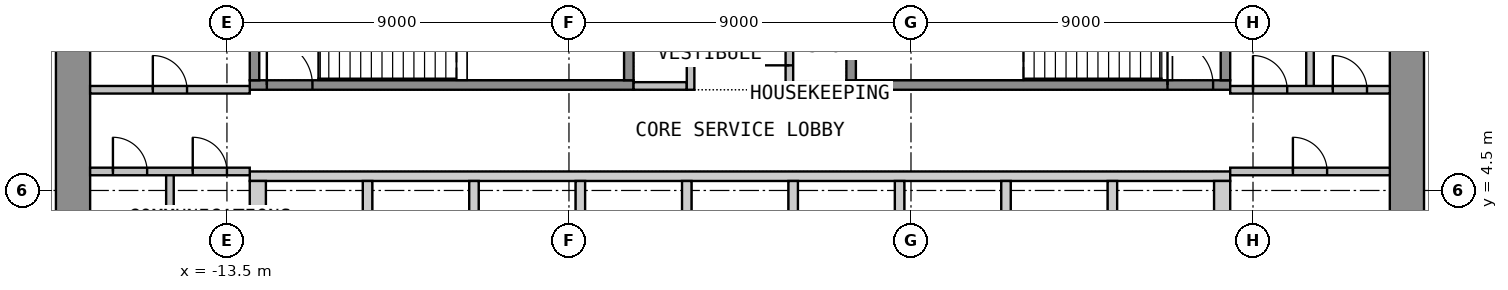
"""IFC4 building model, lengths in metres.
Left out: names, types, materials, properties, quantities, classifications, styles, units other than length and angle.
Written with IfcOpenShell. Run it as: python <this file> out.ifc"""

import sys

from ifc_helpers import new_model, si_unit, direction, frame, frame_2d, origin, place, context, subcontext, project, spatial, polyline, rectangle, outline, extrude, element, fill, save


model = new_model("IFC4")
c1 = context("Model", 3, precision=1e-05, world=origin(), true_north=direction((0.0, 1.0)))
c2 = subcontext(c1, "Body", "Model", "MODEL_VIEW")
j1 = project(units=[si_unit("LENGTHUNIT", "METRE"), si_unit("PLANEANGLEUNIT", "RADIAN")], contexts=[c1])
p1 = place(None, origin())
s1 = spatial("IfcSite", under=j1, at=p1, CompositionType="ELEMENT")
p2 = place(p1, origin())
s2 = spatial("IfcBuilding", under=s1, at=p2, CompositionType="ELEMENT")
p3 = place(p2, frame((0.0, 0.0, 15.6)))
s3 = spatial("IfcBuildingStorey", under=s2, at=p3, CompositionType="ELEMENT", Elevation=15.6)
p4 = place(p3, frame((-17.55, -12.6, 0.0), z_axis=(0.0, 0.0, 1.0), x_axis=(0.0, 1.0, 0.0)))
e1 = element("IfcWall", 1, at=p4, inside=s3, PredefinedType="SHEAR", context=c2, shape_type="SweptSolid", body=[
    extrude(rectangle(XDim=25.2, YDim=0.9, at=frame_2d((12.6, 0.0))), origin(), (0.0, 0.0, 1.0), 4.4),
])
p5 = place(p4, frame((11.4, 0.0, 0.0)))
e2 = element("IfcOpeningElement", 2, at=p5, cuts=e1, PredefinedType="OPENING", context=c2, shape_type="SweptSolid", body=[
    extrude(rectangle(XDim=2.4, YDim=2.1, at=frame_2d((1.2, 1.05))), frame((0.0, 0.46, 0.0), z_axis=(0.0, -1.0, 0.0), x_axis=(1.0, 0.0, 0.0)), (0.0, 0.0, 1.0), 0.92),
])
p6 = place(p3, frame((17.55, -12.6, 0.0), z_axis=(0.0, 0.0, 1.0), x_axis=(0.0, 1.0, 0.0)))
e3 = element("IfcWall", 3, at=p6, inside=s3, PredefinedType="SHEAR", context=c2, shape_type="SweptSolid", body=[
    extrude(rectangle(XDim=25.2, YDim=0.9, at=frame_2d((12.6, 0.0))), origin(), (0.0, 0.0, 1.0), 4.4),
])
p7 = place(p6, frame((11.4, 0.0, 0.0)))
e4 = element("IfcOpeningElement", 4, at=p7, cuts=e3, PredefinedType="OPENING", context=c2, shape_type="SweptSolid", body=[
    extrude(rectangle(XDim=2.4, YDim=2.1, at=frame_2d((1.2, 1.05))), frame((0.0, 0.46, 0.0), z_axis=(0.0, -1.0, 0.0), x_axis=(1.0, 0.0, 0.0)), (0.0, 0.0, 1.0), 0.92),
])
p8 = place(p3, origin())
e5 = element("IfcWall", 5, at=p8, inside=s3, PredefinedType="SHEAR", context=c2, shape_type="SweptSolid", body=[
    extrude(outline(polyline([(-12.9, 4.75), (12.9, 4.75), (12.9, 5.0), (-12.9, 5.0), (-12.9, 4.75)])), origin(), (0.0, 0.0, 1.0), 4.4),
])
p9 = place(p3, origin())
e6 = element("IfcWall", 6, at=p9, inside=s3, PredefinedType="SHEAR", context=c2, shape_type="SweptSolid", body=[
    extrude(outline(polyline([(-12.9, 2.05), (-12.475, 2.05), (-12.475, 4.75), (-12.9, 4.75), (-12.9, 2.05)])), origin(), (0.0, 0.0, 1.0), 4.4),
])
p10 = place(p3, origin())
e7 = element("IfcWall", 7, at=p10, inside=s3, PredefinedType="SHEAR", context=c2, shape_type="SweptSolid", body=[
    extrude(outline(polyline([(-9.925, 2.05), (-9.675, 2.05), (-9.675, 4.75), (-9.925, 4.75), (-9.925, 2.05)])), origin(), (0.0, 0.0, 1.0), 4.4),
])
p11 = place(p3, origin())
e8 = element("IfcWall", 8, at=p11, inside=s3, PredefinedType="SHEAR", context=c2, shape_type="SweptSolid", body=[
    extrude(outline(polyline([(-7.125, 2.05), (-6.875, 2.05), (-6.875, 4.75), (-7.125, 4.75), (-7.125, 2.05)])), origin(), (0.0, 0.0, 1.0), 4.4),
])
p12 = place(p3, origin())
e9 = element("IfcWall", 9, at=p12, inside=s3, PredefinedType="SHEAR", context=c2, shape_type="SweptSolid", body=[
    extrude(outline(polyline([(-4.325, 2.05), (-4.075, 2.05), (-4.075, 4.75), (-4.325, 4.75), (-4.325, 2.05)])), origin(), (0.0, 0.0, 1.0), 4.4),
])
p13 = place(p3, origin())
e10 = element("IfcWall", 10, at=p13, inside=s3, PredefinedType="SHEAR", context=c2, shape_type="SweptSolid", body=[
    extrude(outline(polyline([(-1.525, 2.05), (-1.275, 2.05), (-1.275, 4.75), (-1.525, 4.75), (-1.525, 2.05)])), origin(), (0.0, 0.0, 1.0), 4.4),
])
p14 = place(p3, origin())
e11 = element("IfcWall", 11, at=p14, inside=s3, PredefinedType="SHEAR", context=c2, shape_type="SweptSolid", body=[
    extrude(outline(polyline([(1.275, 2.05), (1.525, 2.05), (1.525, 4.75), (1.275, 4.75), (1.275, 2.05)])), origin(), (0.0, 0.0, 1.0), 4.4),
])
p15 = place(p3, origin())
e12 = element("IfcWall", 12, at=p15, inside=s3, PredefinedType="SHEAR", context=c2, shape_type="SweptSolid", body=[
    extrude(outline(polyline([(4.075, 2.05), (4.325, 2.05), (4.325, 4.75), (4.075, 4.75), (4.075, 2.05)])), origin(), (0.0, 0.0, 1.0), 4.4),
])
p16 = place(p3, origin())
e13 = element("IfcWall", 13, at=p16, inside=s3, PredefinedType="SHEAR", context=c2, shape_type="SweptSolid", body=[
    extrude(outline(polyline([(6.875, 2.05), (7.125, 2.05), (7.125, 4.75), (6.875, 4.75), (6.875, 2.05)])), origin(), (0.0, 0.0, 1.0), 4.4),
])
p17 = place(p3, origin())
e14 = element("IfcWall", 14, at=p17, inside=s3, PredefinedType="SHEAR", context=c2, shape_type="SweptSolid", body=[
    extrude(outline(polyline([(9.675, 2.05), (9.925, 2.05), (9.925, 4.75), (9.675, 4.75), (9.675, 2.05)])), origin(), (0.0, 0.0, 1.0), 4.4),
])
p18 = place(p3, origin())
e15 = element("IfcWall", 15, at=p18, inside=s3, PredefinedType="SHEAR", context=c2, shape_type="SweptSolid", body=[
    extrude(outline(polyline([(12.475, 2.05), (12.9, 2.05), (12.9, 4.75), (12.475, 4.75), (12.475, 2.05)])), origin(), (0.0, 0.0, 1.0), 4.4),
])
p19 = place(p3, frame((-12.9, 7.275, 0.0), z_axis=(0.0, 0.0, 1.0), x_axis=(1.0, 0.0, 0.0)))
e16 = element("IfcWall", 16, at=p19, inside=s3, PredefinedType="SHEAR", context=c2, shape_type="SweptSolid", body=[
    extrude(rectangle(XDim=10.1, YDim=0.25, at=frame_2d((5.05, 0.0))), origin(), (0.0, 0.0, 1.0), 4.4),
])
p20 = place(p19, frame((0.45, 0.0, 0.0)))
e17 = element("IfcOpeningElement", 17, at=p20, cuts=e16, PredefinedType="OPENING", context=c2, shape_type="SweptSolid", body=[
    extrude(rectangle(XDim=1.2, YDim=2.1, at=frame_2d((0.6, 1.05))), frame((0.0, 0.135, 0.0), z_axis=(0.0, -1.0, 0.0), x_axis=(1.0, 0.0, 0.0)), (0.0, 0.0, 1.0), 0.27),
])
for number, where, z_axis, x_axis in (
    (18, (-12.775, 7.4, 0.0), (0.0, 0.0, 1.0), (0.0, 1.0, 0.0)),
    (19, (-2.925, 7.4, 0.0), (0.0, 0.0, 1.0), (0.0, 1.0, 0.0)),
):
    element("IfcWall", number, at=place(p3, frame(where, z_axis=z_axis, x_axis=x_axis)), inside=s3, PredefinedType="SHEAR", context=c2, shape_type="SweptSolid", body=[
        extrude(rectangle(XDim=3.25, YDim=0.25, at=frame_2d((1.625, 0.0))), origin(), (0.0, 0.0, 1.0), 4.4),
    ])
p21 = place(p3, frame((2.8, 7.275, 0.0), z_axis=(0.0, 0.0, 1.0), x_axis=(1.0, 0.0, 0.0)))
e20 = element("IfcWall", 20, at=p21, inside=s3, PredefinedType="SHEAR", context=c2, shape_type="SweptSolid", body=[
    extrude(rectangle(XDim=10.1, YDim=0.25, at=frame_2d((5.05, 0.0))), origin(), (0.0, 0.0, 1.0), 4.4),
])
p22 = place(p21, frame((8.45, 0.0, 0.0)))
e21 = element("IfcOpeningElement", 21, at=p22, cuts=e20, PredefinedType="OPENING", context=c2, shape_type="SweptSolid", body=[
    extrude(rectangle(XDim=1.2, YDim=2.1, at=frame_2d((0.6, 1.05))), frame((0.0, 0.135, 0.0), z_axis=(0.0, -1.0, 0.0), x_axis=(1.0, 0.0, 0.0)), (0.0, 0.0, 1.0), 0.27),
])
for number, where, z_axis, x_axis in (
    (22, (2.925, 7.4, 0.0), (0.0, 0.0, 1.0), (0.0, 1.0, 0.0)),
    (23, (12.775, 7.4, 0.0), (0.0, 0.0, 1.0), (0.0, 1.0, 0.0)),
):
    element("IfcWall", number, at=place(p3, frame(where, z_axis=z_axis, x_axis=x_axis)), inside=s3, PredefinedType="SHEAR", context=c2, shape_type="SweptSolid", body=[
        extrude(rectangle(XDim=3.25, YDim=0.25, at=frame_2d((1.625, 0.0))), origin(), (0.0, 0.0, 1.0), 4.4),
    ])
for number, where, z_axis, x_axis in (
    (24, (-2.8, 7.25, 0.0), (0.0, 0.0, 1.0), (1.0, 0.0, 0.0)),
    (25, (1.4, 7.25, 0.0), (0.0, 0.0, 1.0), (1.0, 0.0, 0.0)),
):
    element("IfcWall", number, at=place(p3, frame(where, z_axis=z_axis, x_axis=x_axis)), inside=s3, PredefinedType="PARTITIONING", context=c2, shape_type="SweptSolid", body=[
        extrude(rectangle(XDim=1.4, YDim=0.2, at=frame_2d((0.7, 0.0))), origin(), (0.0, 0.0, 1.0), 4.4),
    ])
p23 = place(p3, frame((-1.3, 7.15, 0.0), z_axis=(0.0, 0.0, 1.0), x_axis=(0.0, 1.0, 0.0)))
e26 = element("IfcWall", 26, at=p23, inside=s3, PredefinedType="PARTITIONING", context=c2, shape_type="SweptSolid", body=[
    extrude(rectangle(XDim=5.45, YDim=0.2, at=frame_2d((2.725, 0.0))), origin(), (0.0, 0.0, 1.0), 4.4),
])
p24 = place(p23, frame((1.587, 0.0, 0.0)))
e27 = element("IfcOpeningElement", 27, at=p24, cuts=e26, PredefinedType="OPENING", context=c2, shape_type="SweptSolid", body=[
    extrude(rectangle(XDim=0.9, YDim=2.1, at=frame_2d((0.45, 1.05))), frame((0.0, 0.11, 0.0), z_axis=(0.0, -1.0, 0.0), x_axis=(1.0, 0.0, 0.0)), (0.0, 0.0, 1.0), 0.22),
])
p25 = place(p23, frame((4.212, 0.0, 0.0)))
e28 = element("IfcOpeningElement", 28, at=p25, cuts=e26, PredefinedType="OPENING", context=c2, shape_type="SweptSolid", body=[
    extrude(rectangle(XDim=0.9, YDim=2.1, at=frame_2d((0.45, 1.05))), frame((0.0, 0.11, 0.0), z_axis=(0.0, -1.0, 0.0), x_axis=(1.0, 0.0, 0.0)), (0.0, 0.0, 1.0), 0.22),
])
p26 = place(p3, frame((1.3, 7.15, 0.0), z_axis=(0.0, 0.0, 1.0), x_axis=(0.0, 1.0, 0.0)))
e29 = element("IfcWall", 29, at=p26, inside=s3, PredefinedType="PARTITIONING", context=c2, shape_type="SweptSolid", body=[
    extrude(rectangle(XDim=5.45, YDim=0.2, at=frame_2d((2.725, 0.0))), origin(), (0.0, 0.0, 1.0), 4.4),
])
p27 = place(p26, frame((0.643, 0.0, 0.0)))
e30 = element("IfcOpeningElement", 30, at=p27, cuts=e29, PredefinedType="OPENING", context=c2, shape_type="SweptSolid", body=[
    extrude(rectangle(XDim=0.9, YDim=2.1, at=frame_2d((0.45, 1.05))), frame((0.0, 0.11, 0.0), z_axis=(0.0, -1.0, 0.0), x_axis=(1.0, 0.0, 0.0)), (0.0, 0.0, 1.0), 0.22),
])
p28 = place(p26, frame((2.401, 0.0, 0.0)))
e31 = element("IfcOpeningElement", 31, at=p28, cuts=e29, PredefinedType="OPENING", context=c2, shape_type="SweptSolid", body=[
    extrude(rectangle(XDim=0.9, YDim=2.1, at=frame_2d((0.45, 1.05))), frame((0.0, 0.11, 0.0), z_axis=(0.0, -1.0, 0.0), x_axis=(1.0, 0.0, 0.0)), (0.0, 0.0, 1.0), 0.22),
])
p29 = place(p26, frame((4.134, 0.0, 0.0)))
e32 = element("IfcOpeningElement", 32, at=p29, cuts=e29, PredefinedType="OPENING", context=c2, shape_type="SweptSolid", body=[
    extrude(rectangle(XDim=0.9, YDim=2.1, at=frame_2d((0.45, 1.05))), frame((0.0, 0.11, 0.0), z_axis=(0.0, -1.0, 0.0), x_axis=(1.0, 0.0, 0.0)), (0.0, 0.0, 1.0), 0.22),
])
p30 = place(p3, frame((-17.1, 7.15, 0.0), z_axis=(0.0, 0.0, 1.0), x_axis=(1.0, 0.0, 0.0)))
e33 = element("IfcWall", 33, at=p30, inside=s3, PredefinedType="PARTITIONING", context=c2, shape_type="SweptSolid", body=[
    extrude(rectangle(XDim=4.2, YDim=0.2, at=frame_2d((2.1, 0.0))), origin(), (0.0, 0.0, 1.0), 4.4),
])
p31 = place(p30, frame((1.65, 0.0, 0.0)))
e34 = element("IfcOpeningElement", 34, at=p31, cuts=e33, PredefinedType="OPENING", context=c2, shape_type="SweptSolid", body=[
    extrude(rectangle(XDim=0.9, YDim=2.1, at=frame_2d((0.45, 1.05))), frame((0.0, 0.11, 0.0), z_axis=(0.0, -1.0, 0.0), x_axis=(1.0, 0.0, 0.0)), (0.0, 0.0, 1.0), 0.22),
])
p32 = place(p3, frame((-15.0, 1.8, 0.0), z_axis=(0.0, 0.0, 1.0), x_axis=(0.0, 1.0, 0.0)))
e35 = element("IfcWall", 35, at=p32, inside=s3, PredefinedType="PARTITIONING", context=c2, shape_type="SweptSolid", body=[
    extrude(rectangle(XDim=3.2, YDim=0.2, at=frame_2d((1.6, 0.0))), origin(), (0.0, 0.0, 1.0), 4.4),
])
p33 = place(p3, frame((-17.1, 5.0, 0.0), z_axis=(0.0, 0.0, 1.0), x_axis=(1.0, 0.0, 0.0)))
e36 = element("IfcWall", 36, at=p33, inside=s3, PredefinedType="PARTITIONING", context=c2, shape_type="SweptSolid", body=[
    extrude(rectangle(XDim=4.2, YDim=0.2, at=frame_2d((2.1, 0.0))), origin(), (0.0, 0.0, 1.0), 4.4),
])
p34 = place(p33, frame((0.6, 0.0, 0.0)))
e37 = element("IfcOpeningElement", 37, at=p34, cuts=e36, PredefinedType="OPENING", context=c2, shape_type="SweptSolid", body=[
    extrude(rectangle(XDim=0.9, YDim=2.1, at=frame_2d((0.45, 1.05))), frame((0.0, 0.11, 0.0), z_axis=(0.0, -1.0, 0.0), x_axis=(1.0, 0.0, 0.0)), (0.0, 0.0, 1.0), 0.22),
])
p35 = place(p33, frame((2.7, 0.0, 0.0)))
e38 = element("IfcOpeningElement", 38, at=p35, cuts=e36, PredefinedType="OPENING", context=c2, shape_type="SweptSolid", body=[
    extrude(rectangle(XDim=0.9, YDim=2.1, at=frame_2d((0.45, 1.05))), frame((0.0, 0.11, 0.0), z_axis=(0.0, -1.0, 0.0), x_axis=(1.0, 0.0, 0.0)), (0.0, 0.0, 1.0), 0.22),
])
p36 = place(p3, frame((15.0, 7.15, 0.0), z_axis=(0.0, 0.0, 1.0), x_axis=(0.0, 1.0, 0.0)))
e39 = element("IfcWall", 39, at=p36, inside=s3, PredefinedType="PARTITIONING", context=c2, shape_type="SweptSolid", body=[
    extrude(rectangle(XDim=5.45, YDim=0.2, at=frame_2d((2.725, 0.0))), origin(), (0.0, 0.0, 1.0), 4.4),
])
p37 = place(p3, frame((12.9, 7.15, 0.0), z_axis=(0.0, 0.0, 1.0), x_axis=(1.0, 0.0, 0.0)))
e40 = element("IfcWall", 40, at=p37, inside=s3, PredefinedType="PARTITIONING", context=c2, shape_type="SweptSolid", body=[
    extrude(rectangle(XDim=4.2, YDim=0.2, at=frame_2d((2.1, 0.0))), origin(), (0.0, 0.0, 1.0), 4.4),
])
p38 = place(p37, frame((0.6, 0.0, 0.0)))
e41 = element("IfcOpeningElement", 41, at=p38, cuts=e40, PredefinedType="OPENING", context=c2, shape_type="SweptSolid", body=[
    extrude(rectangle(XDim=0.9, YDim=2.1, at=frame_2d((0.45, 1.05))), frame((0.0, 0.11, 0.0), z_axis=(0.0, -1.0, 0.0), x_axis=(1.0, 0.0, 0.0)), (0.0, 0.0, 1.0), 0.22),
])
p39 = place(p37, frame((2.7, 0.0, 0.0)))
e42 = element("IfcOpeningElement", 42, at=p39, cuts=e40, PredefinedType="OPENING", context=c2, shape_type="SweptSolid", body=[
    extrude(rectangle(XDim=0.9, YDim=2.1, at=frame_2d((0.45, 1.05))), frame((0.0, 0.11, 0.0), z_axis=(0.0, -1.0, 0.0), x_axis=(1.0, 0.0, 0.0)), (0.0, 0.0, 1.0), 0.22),
])
p40 = place(p3, frame((12.9, 5.0, 0.0), z_axis=(0.0, 0.0, 1.0), x_axis=(1.0, 0.0, 0.0)))
e43 = element("IfcWall", 43, at=p40, inside=s3, PredefinedType="PARTITIONING", context=c2, shape_type="SweptSolid", body=[
    extrude(rectangle(XDim=4.2, YDim=0.2, at=frame_2d((2.1, 0.0))), origin(), (0.0, 0.0, 1.0), 4.4),
])
p41 = place(p40, frame((1.65, 0.0, 0.0)))
e44 = element("IfcOpeningElement", 44, at=p41, cuts=e43, PredefinedType="OPENING", context=c2, shape_type="SweptSolid", body=[
    extrude(rectangle(XDim=0.9, YDim=2.1, at=frame_2d((0.45, 1.05))), frame((0.0, 0.11, 0.0), z_axis=(0.0, -1.0, 0.0), x_axis=(1.0, 0.0, 0.0)), (0.0, 0.0, 1.0), 0.22),
])
p42 = place(p20, origin())
e45 = element("IfcDoor", 45, at=p42, inside=s3, OperationType="SINGLE_SWING_LEFT", PredefinedType="DOOR", context=c2, shape_type="SweptSolid", body=[
    extrude(rectangle(XDim=1.2, YDim=2.1, at=frame_2d((0.6, 1.05))), frame((0.0, 0.025, 0.0), z_axis=(0.0, -1.0, 0.0), x_axis=(1.0, 0.0, 0.0)), (0.0, 0.0, 1.0), 0.05),
])
fill(e17, e45)
p43 = place(p22, origin())
e46 = element("IfcDoor", 46, at=p43, inside=s3, OperationType="SINGLE_SWING_LEFT", PredefinedType="DOOR", context=c2, shape_type="SweptSolid", body=[
    extrude(rectangle(XDim=1.2, YDim=2.1, at=frame_2d((0.6, 1.05))), frame((0.0, 0.025, 0.0), z_axis=(0.0, -1.0, 0.0), x_axis=(1.0, 0.0, 0.0)), (0.0, 0.0, 1.0), 0.05),
])
fill(e21, e46)
p44 = place(p27, origin())
e47 = element("IfcDoor", 47, at=p44, inside=s3, OperationType="SINGLE_SWING_LEFT", PredefinedType="DOOR", context=c2, shape_type="SweptSolid", body=[
    extrude(rectangle(XDim=0.9, YDim=2.1, at=frame_2d((0.45, 1.05))), frame((0.0, 0.025, 0.0), z_axis=(0.0, -1.0, 0.0), x_axis=(1.0, 0.0, 0.0)), (0.0, 0.0, 1.0), 0.05),
])
fill(e30, e47)
p45 = place(p31, origin())
e48 = element("IfcDoor", 48, at=p45, inside=s3, OperationType="SINGLE_SWING_LEFT", PredefinedType="DOOR", context=c2, shape_type="SweptSolid", body=[
    extrude(rectangle(XDim=0.9, YDim=2.1, at=frame_2d((0.45, 1.05))), frame((0.0, 0.025, 0.0), z_axis=(0.0, -1.0, 0.0), x_axis=(1.0, 0.0, 0.0)), (0.0, 0.0, 1.0), 0.05),
])
fill(e34, e48)
p46 = place(p34, origin())
e49 = element("IfcDoor", 49, at=p46, inside=s3, OperationType="SINGLE_SWING_LEFT", PredefinedType="DOOR", context=c2, shape_type="SweptSolid", body=[
    extrude(rectangle(XDim=0.9, YDim=2.1, at=frame_2d((0.45, 1.05))), frame((0.0, 0.025, 0.0), z_axis=(0.0, -1.0, 0.0), x_axis=(1.0, 0.0, 0.0)), (0.0, 0.0, 1.0), 0.05),
])
fill(e37, e49)
p47 = place(p35, origin())
e50 = element("IfcDoor", 50, at=p47, inside=s3, OperationType="SINGLE_SWING_LEFT", PredefinedType="DOOR", context=c2, shape_type="SweptSolid", body=[
    extrude(rectangle(XDim=0.9, YDim=2.1, at=frame_2d((0.45, 1.05))), frame((0.0, 0.025, 0.0), z_axis=(0.0, -1.0, 0.0), x_axis=(1.0, 0.0, 0.0)), (0.0, 0.0, 1.0), 0.05),
])
fill(e38, e50)
p48 = place(p38, origin())
e51 = element("IfcDoor", 51, at=p48, inside=s3, OperationType="SINGLE_SWING_LEFT", PredefinedType="DOOR", context=c2, shape_type="SweptSolid", body=[
    extrude(rectangle(XDim=0.9, YDim=2.1, at=frame_2d((0.45, 1.05))), frame((0.0, 0.025, 0.0), z_axis=(0.0, -1.0, 0.0), x_axis=(1.0, 0.0, 0.0)), (0.0, 0.0, 1.0), 0.05),
])
fill(e41, e51)
p49 = place(p39, origin())
e52 = element("IfcDoor", 52, at=p49, inside=s3, OperationType="SINGLE_SWING_LEFT", PredefinedType="DOOR", context=c2, shape_type="SweptSolid", body=[
    extrude(rectangle(XDim=0.9, YDim=2.1, at=frame_2d((0.45, 1.05))), frame((0.0, 0.025, 0.0), z_axis=(0.0, -1.0, 0.0), x_axis=(1.0, 0.0, 0.0)), (0.0, 0.0, 1.0), 0.05),
])
fill(e42, e52)
p50 = place(p41, origin())
e53 = element("IfcDoor", 53, at=p50, inside=s3, OperationType="SINGLE_SWING_LEFT", PredefinedType="DOOR", context=c2, shape_type="SweptSolid", body=[
    extrude(rectangle(XDim=0.9, YDim=2.1, at=frame_2d((0.45, 1.05))), frame((0.0, 0.025, 0.0), z_axis=(0.0, -1.0, 0.0), x_axis=(1.0, 0.0, 0.0)), (0.0, 0.0, 1.0), 0.05),
])
fill(e44, e53)
save(model, sys.argv[1])
